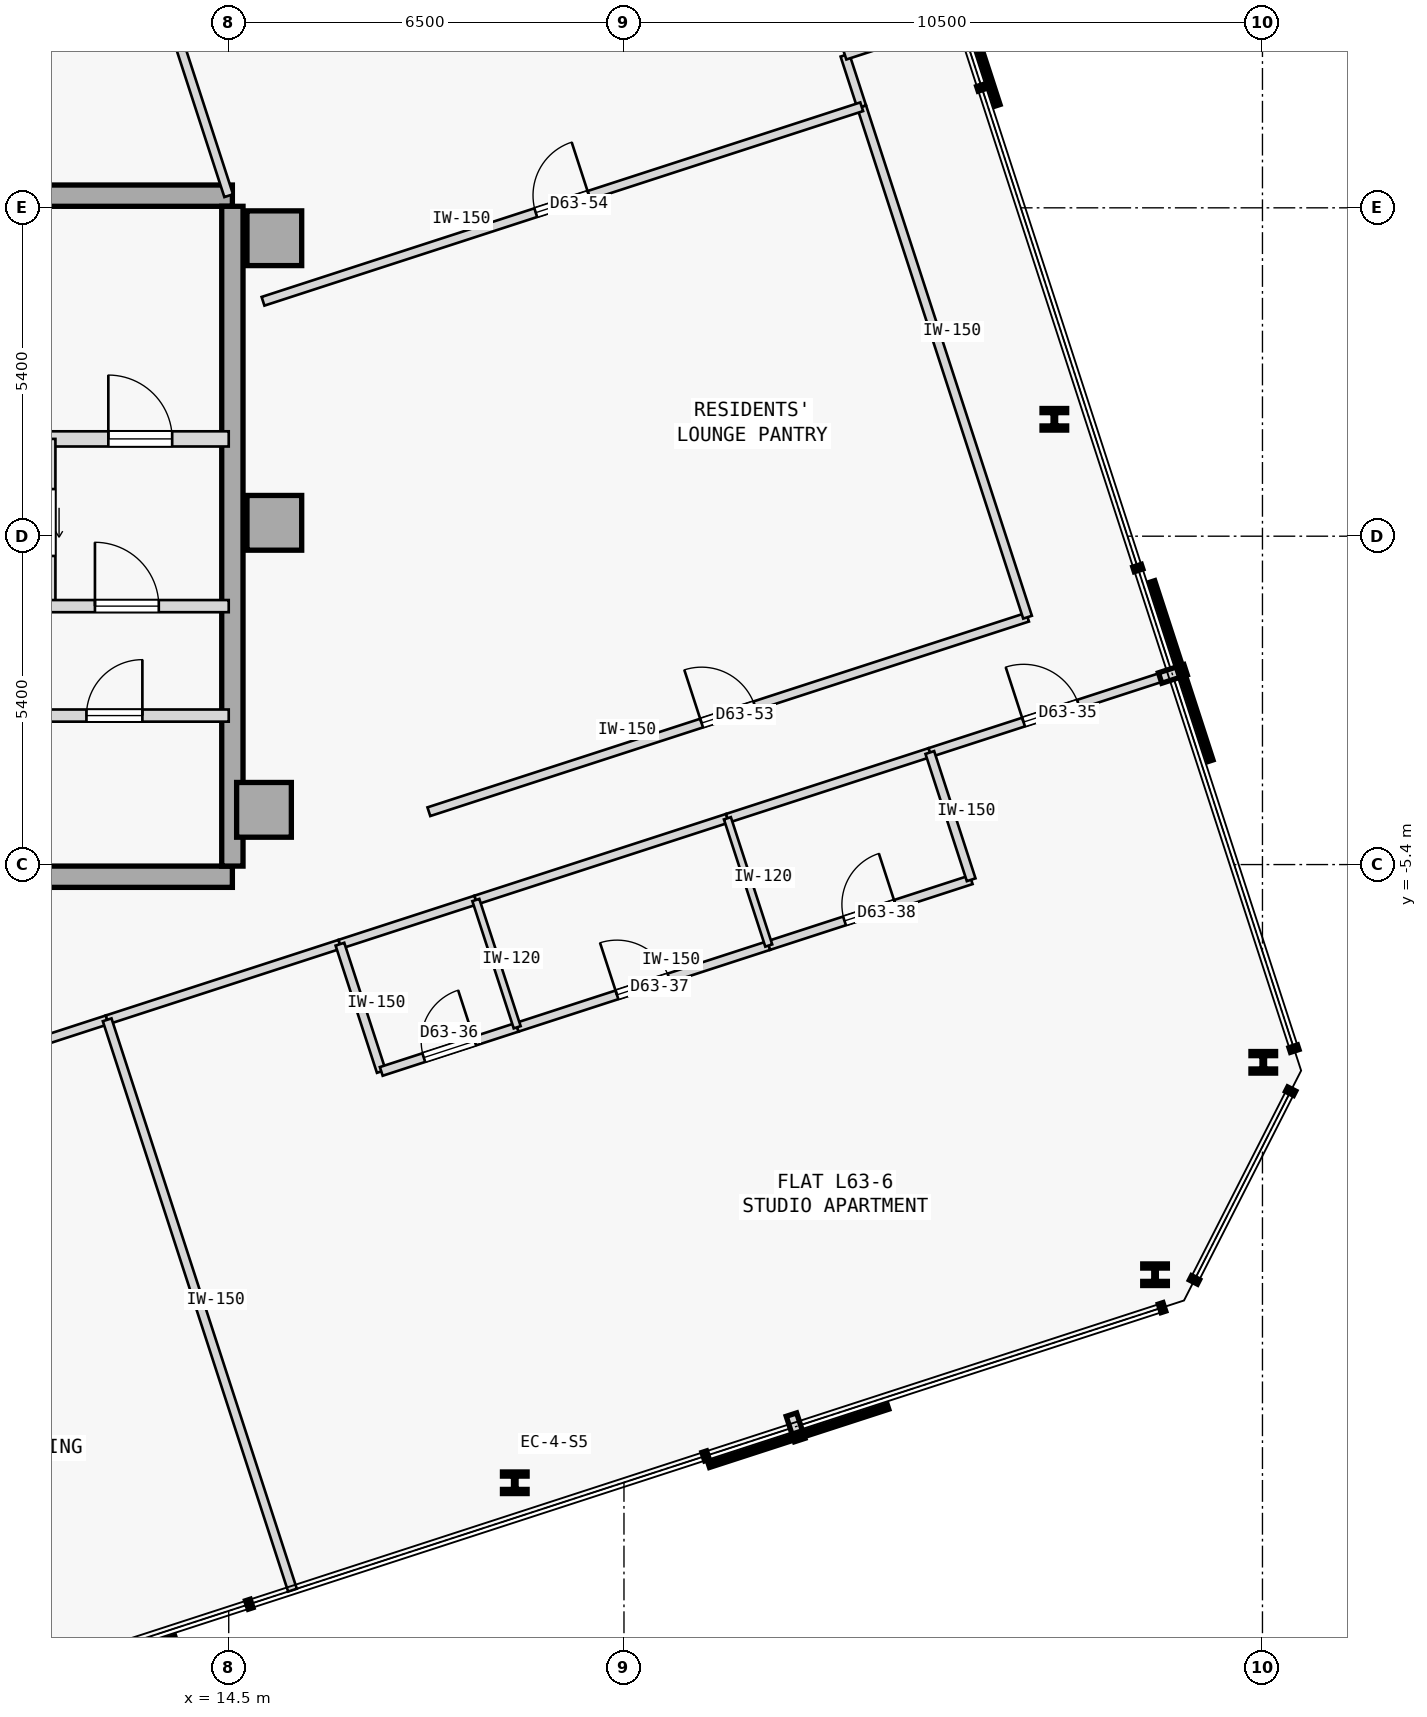
"""IFC4 building model, lengths in metres.
Left out: names, types, materials, properties, quantities, classifications, styles, units other than length and angle.
Written with IfcOpenShell. Run it as: python <this file> out.ifc"""

import sys

from ifc_helpers import new_model, si_unit, direction, frame, frame_2d, origin, origin_2d, place, context, subcontext, project, spatial, rectangle, i_section, extrude, element, fill, save


model = new_model("IFC4")
c1 = context("Model", 3, precision=1e-05, world=origin(), true_north=direction((0.0, 1.0)))
c2 = subcontext(c1, "Body", "Model", "MODEL_VIEW")
j1 = project(units=[si_unit("LENGTHUNIT", "METRE"), si_unit("PLANEANGLEUNIT", "RADIAN")], contexts=[c1])
p1 = place(None, origin())
s1 = spatial("IfcSite", under=j1, at=p1, CompositionType="ELEMENT")
p2 = place(p1, origin())
s2 = spatial("IfcBuilding", under=s1, at=p2, CompositionType="ELEMENT")
p3 = place(p2, frame((0.0, 0.0, 237.7)))
s3 = spatial("IfcBuildingStorey", under=s2, at=p3, CompositionType="ELEMENT", Elevation=237.7)
for number, where, z_axis, x_axis in (
    (1, (15.25, 4.9, 0.0), (0.0, 0.0, 1.0), (1.0, 0.0, 0.0)),
    (2, (15.25, 0.22, 0.0), (0.0, 0.0, 1.0), (1.0, 0.0, 0.0)),
    (3, (15.08, -4.5, 0.0), (0.0, 0.0, 1.0), (1.0, 0.0, 0.0)),
):
    element("IfcColumn", number, at=place(p3, frame(where, z_axis=z_axis, x_axis=x_axis)), inside=s3, PredefinedType="COLUMN", context=c2, shape_type="SweptSolid", body=[
        extrude(rectangle(XDim=0.9, YDim=0.9, at=origin_2d()), origin(), (0.0, 0.0, 1.0), 3.35),
    ])
p4 = place(p3, frame((3.15, 5.6, 0.0), z_axis=(0.0, 0.0, 1.0), x_axis=(1.0, 0.0, 0.0)))
e4 = element("IfcWall", 4, at=p4, inside=s3, PredefinedType="SHEAR", context=c2, shape_type="SweptSolid", body=[
    extrude(rectangle(XDim=11.41, YDim=0.35, at=frame_2d((5.705, 0.0))), origin(), (0.0, 0.0, 1.0), 3.125),
])
p5 = place(p3, frame((3.7, -5.6, 0.0), z_axis=(0.0, 0.0, 1.0), x_axis=(1.0, 0.0, 0.0)))
e5 = element("IfcWall", 5, at=p5, inside=s3, PredefinedType="SHEAR", context=c2, shape_type="SweptSolid", body=[
    extrude(rectangle(XDim=10.86, YDim=0.35, at=frame_2d((5.43, 0.0))), origin(), (0.0, 0.0, 1.0), 3.125),
])
p6 = place(p3, frame((14.56, -5.425, 0.0), z_axis=(0.0, 0.0, 1.0), x_axis=(0.0, 1.0, 0.0)))
e6 = element("IfcWall", 6, at=p6, inside=s3, PredefinedType="SHEAR", context=c2, shape_type="SweptSolid", body=[
    extrude(rectangle(XDim=10.85, YDim=0.35, at=frame_2d((5.425, 0.0))), origin(), (0.0, 0.0, 1.0), 3.125),
])
for number, where, z_axis, x_axis in (
    (7, (19.204, -15.566, 0.0), (0.0, 0.0, 1.0), (1.0, 0.0, 0.0)),
    (8, (29.734, -12.145, 0.0), (0.0, 0.0, 1.0), (1.0, 0.0, 0.0)),
    (9, (31.513, -8.652, 0.0), (0.0, 0.0, 1.0), (1.0, 0.0, 0.0)),
    (10, (28.078, 1.922, 0.0), (0.0, 0.0, 1.0), (1.0, 0.0, 0.0)),
):
    element("IfcColumn", number, at=place(p3, frame(where, z_axis=z_axis, x_axis=x_axis)), inside=s3, PredefinedType="COLUMN", context=c2, shape_type="SweptSolid", body=[
        extrude(i_section(OverallWidth=0.405, OverallDepth=0.355, WebThickness=0.042, FlangeThickness=0.068, FilletRadius=0.015, at=origin_2d()), origin(), (0.0, 0.0, 1.0), 3.35),
    ])
p7 = place(p3, frame((10.9, 1.6, 0.0), z_axis=(0.0, 0.0, 1.0), x_axis=(1.0, 0.0, 0.0)))
e11 = element("IfcWall", 11, at=p7, inside=s3, PredefinedType="STANDARD", context=c2, shape_type="SweptSolid", body=[
    extrude(rectangle(XDim=3.6, YDim=0.25, at=frame_2d((1.8, 0.0))), origin(), (0.0, 0.0, 1.0), 3.125),
])
p8 = place(p7, frame((1.62, 0.0, 0.0)))
e12 = element("IfcOpeningElement", 12, at=p8, cuts=e11, PredefinedType="OPENING", context=c2, shape_type="SweptSolid", body=[
    extrude(rectangle(XDim=1.05, YDim=2.15, at=frame_2d((0.525, 1.075))), frame((0.0, 0.135, 0.0), z_axis=(0.0, -1.0, 0.0), x_axis=(1.0, 0.0, 0.0)), (0.0, 0.0, 1.0), 0.27),
])
p9 = place(p3, frame((11.55, -1.15, 0.0), z_axis=(0.0, 0.0, 1.0), x_axis=(0.0, 1.0, 0.0)))
e13 = element("IfcWall", 13, at=p9, inside=s3, PredefinedType="STANDARD", context=c2, shape_type="SweptSolid", body=[
    extrude(rectangle(XDim=2.75, YDim=0.2, at=frame_2d((1.375, 0.0))), origin(), (0.0, 0.0, 1.0), 3.125),
])
p10 = place(p9, frame((0.825, 0.0, 0.0)))
e14 = element("IfcOpeningElement", 14, at=p10, cuts=e13, PredefinedType="OPENING", context=c2, shape_type="SweptSolid", body=[
    extrude(rectangle(XDim=1.1, YDim=2.15, at=frame_2d((0.55, 1.075))), frame((0.0, 0.11, 0.0), z_axis=(0.0, -1.0, 0.0), x_axis=(1.0, 0.0, 0.0)), (0.0, 0.0, 1.0), 0.22),
])
p11 = place(p3, frame((11.55, -1.15, 0.0), z_axis=(0.0, 0.0, 1.0), x_axis=(1.0, 0.0, 0.0)))
e15 = element("IfcWall", 15, at=p11, inside=s3, PredefinedType="STANDARD", context=c2, shape_type="SweptSolid", body=[
    extrude(rectangle(XDim=2.95, YDim=0.2, at=frame_2d((1.475, 0.0))), origin(), (0.0, 0.0, 1.0), 3.125),
])
p12 = place(p11, frame((0.75, 0.0, 0.0)))
e16 = element("IfcOpeningElement", 16, at=p12, cuts=e15, PredefinedType="OPENING", context=c2, shape_type="SweptSolid", body=[
    extrude(rectangle(XDim=1.05, YDim=2.18, at=frame_2d((0.525, 1.09))), frame((0.0, 0.11, 0.0), z_axis=(0.0, -1.0, 0.0), x_axis=(1.0, 0.0, 0.0)), (0.0, 0.0, 1.0), 0.22),
])
p13 = place(p3, frame((3.7, -2.95, 0.0), z_axis=(0.0, 0.0, 1.0), x_axis=(1.0, 0.0, 0.0)))
e17 = element("IfcWall", 17, at=p13, inside=s3, PredefinedType="STANDARD", context=c2, shape_type="SweptSolid", body=[
    extrude(rectangle(XDim=10.8, YDim=0.2, at=frame_2d((5.4, 0.0))), origin(), (0.0, 0.0, 1.0), 3.125),
])
p14 = place(p13, frame((0.53, 0.0, 0.0)))
e18 = element("IfcOpeningElement", 18, at=p14, cuts=e17, PredefinedType="OPENING", context=c2, shape_type="SweptSolid", body=[
    extrude(rectangle(XDim=1.1, YDim=2.15, at=frame_2d((0.55, 1.075))), frame((0.0, 0.11, 0.0), z_axis=(0.0, -1.0, 0.0), x_axis=(1.0, 0.0, 0.0)), (0.0, 0.0, 1.0), 0.22),
])
p15 = place(p13, frame((4.14, 0.0, 0.0)))
e19 = element("IfcOpeningElement", 19, at=p15, cuts=e17, PredefinedType="OPENING", context=c2, shape_type="SweptSolid", body=[
    extrude(rectangle(XDim=0.92, YDim=2.15, at=frame_2d((0.46, 1.075))), frame((0.0, 0.11, 0.0), z_axis=(0.0, -1.0, 0.0), x_axis=(1.0, 0.0, 0.0)), (0.0, 0.0, 1.0), 0.22),
])
p16 = place(p13, frame((8.46, 0.0, 0.0)))
e20 = element("IfcOpeningElement", 20, at=p16, cuts=e17, PredefinedType="OPENING", context=c2, shape_type="SweptSolid", body=[
    extrude(rectangle(XDim=0.92, YDim=2.15, at=frame_2d((0.46, 1.075))), frame((0.0, 0.11, 0.0), z_axis=(0.0, -1.0, 0.0), x_axis=(1.0, 0.0, 0.0)), (0.0, 0.0, 1.0), 0.22),
])
p17 = place(p3, frame((6.926, -9.765, 0.0), z_axis=(0.0, 0.0, 1.0), x_axis=(0.951054878391, 0.30902203528, 0.0)))
e21 = element("IfcWall", 21, at=p17, inside=s3, PredefinedType="PARTITIONING", context=c2, shape_type="SweptSolid", body=[
    extrude(rectangle(XDim=5.862, YDim=0.15, at=frame_2d((2.931, 0.0))), origin(), (0.0, 0.0, 1.0), 3.125),
])
p18 = place(p17, frame((2.456, 0.0, 0.0)))
e22 = element("IfcOpeningElement", 22, at=p18, cuts=e21, PredefinedType="OPENING", context=c2, shape_type="SweptSolid", body=[
    extrude(rectangle(XDim=0.95, YDim=2.15, at=frame_2d((0.475, 1.075))), frame((0.0, 0.085, 0.0), z_axis=(0.0, -1.0, 0.0), x_axis=(1.0, 0.0, 0.0)), (0.0, 0.0, 1.0), 0.17),
])
p19 = place(p3, frame((12.501, -7.953, 0.0), z_axis=(0.0, 0.0, 1.0), x_axis=(0.951046103464, 0.309049039936, 0.0)))
e23 = element("IfcWall", 23, at=p19, inside=s3, PredefinedType="PARTITIONING", context=c2, shape_type="SweptSolid", body=[
    extrude(rectangle(XDim=4.025, YDim=0.15, at=frame_2d((2.012, 0.0))), origin(), (0.0, 0.0, 1.0), 3.125),
])
p20 = place(p3, frame((26.03, -3.557, 0.0), z_axis=(0.0, 0.0, 1.0), x_axis=(0.951050334989, 0.309036017832, 0.0)))
e24 = element("IfcWall", 24, at=p20, inside=s3, PredefinedType="PARTITIONING", context=c2, shape_type="SweptSolid", body=[
    extrude(rectangle(XDim=4.191, YDim=0.15, at=frame_2d((2.095, 0.0))), origin(), (0.0, 0.0, 1.0), 3.125),
])
p21 = place(p20, frame((1.621, 0.0, 0.0)))
e25 = element("IfcOpeningElement", 25, at=p21, cuts=e24, PredefinedType="OPENING", context=c2, shape_type="SweptSolid", body=[
    extrude(rectangle(XDim=0.95, YDim=2.15, at=frame_2d((0.475, 1.075))), frame((0.0, 0.085, 0.0), z_axis=(0.0, -1.0, 0.0), x_axis=(1.0, 0.0, 0.0)), (0.0, 0.0, 1.0), 0.17),
])
p22 = place(p3, frame((16.329, -6.709, 0.0), z_axis=(0.0, 0.0, 1.0), x_axis=(0.951076048914, 0.308956872689, 0.0)))
e26 = element("IfcWall", 26, at=p22, inside=s3, PredefinedType="PARTITIONING", context=c2, shape_type="SweptSolid", body=[
    extrude(rectangle(XDim=2.35, YDim=0.15, at=frame_2d((1.175, 0.0))), origin(), (0.0, 0.0, 1.0), 3.125),
])
p23 = place(p3, frame((18.564, -5.983, 0.0), z_axis=(0.0, 0.0, 1.0), x_axis=(0.951052627573, 0.309028962374, 0.0)))
e27 = element("IfcWall", 27, at=p23, inside=s3, PredefinedType="PARTITIONING", context=c2, shape_type="SweptSolid", body=[
    extrude(rectangle(XDim=4.35, YDim=0.15, at=frame_2d((2.175, 0.0))), origin(), (0.0, 0.0, 1.0), 3.125),
])
p24 = place(p3, frame((22.701, -4.639, 0.0), z_axis=(0.0, 0.0, 1.0), x_axis=(0.951062257173, 0.308999325213, 0.0)))
e28 = element("IfcWall", 28, at=p24, inside=s3, PredefinedType="PARTITIONING", context=c2, shape_type="SweptSolid", body=[
    extrude(rectangle(XDim=3.5, YDim=0.15, at=frame_2d((1.75, 0.0))), origin(), (0.0, 0.0, 1.0), 3.125),
])
p25 = place(p3, frame((17.791, -4.531, 0.0), z_axis=(0.0, 0.0, 1.0), x_axis=(0.951056769902, 0.309016213852, 0.0)))
e29 = element("IfcWall", 29, at=p25, inside=s3, PredefinedType="PARTITIONING", context=c2, shape_type="SweptSolid", body=[
    extrude(rectangle(XDim=10.352, YDim=0.15, at=frame_2d((5.176, 0.0))), origin(), (0.0, 0.0, 1.0), 3.125),
])
p26 = place(p25, frame((4.716, 0.0, 0.0)))
e30 = element("IfcOpeningElement", 30, at=p26, cuts=e29, PredefinedType="OPENING", context=c2, shape_type="SweptSolid", body=[
    extrude(rectangle(XDim=0.92, YDim=2.15, at=frame_2d((0.46, 1.075))), frame((0.0, 0.085, 0.0), z_axis=(0.0, -1.0, 0.0), x_axis=(1.0, 0.0, 0.0)), (0.0, 0.0, 1.0), 0.17),
])
p27 = place(p3, frame((27.637, -1.332, 0.0), z_axis=(0.0, 0.0, 1.0), x_axis=(-0.309040411618, 0.951048907253, 0.0)))
e31 = element("IfcWall", 31, at=p27, inside=s3, PredefinedType="PARTITIONING", context=c2, shape_type="SweptSolid", body=[
    extrude(rectangle(XDim=8.826, YDim=0.15, at=frame_2d((4.413, 0.0))), origin(), (0.0, 0.0, 1.0), 3.125),
])
p28 = place(p3, frame((24.909, 7.062, 0.0), z_axis=(0.0, 0.0, 1.0), x_axis=(-0.30899324298, 0.951064233263, 0.0)))
e32 = element("IfcWall", 32, at=p28, inside=s3, PredefinedType="PARTITIONING", context=c2, shape_type="SweptSolid", body=[
    extrude(rectangle(XDim=0.892, YDim=0.15, at=frame_2d((0.446, 0.0))), origin(), (0.0, 0.0, 1.0), 3.125),
])
p29 = place(p3, frame((24.634, 7.91, 0.0), z_axis=(0.0, 0.0, 1.0), x_axis=(0.951054051148, 0.309024581215, 0.0)))
e33 = element("IfcWall", 33, at=p29, inside=s3, PredefinedType="PARTITIONING", context=c2, shape_type="SweptSolid", body=[
    extrude(rectangle(XDim=1.975, YDim=0.15, at=frame_2d((0.988, 0.0))), origin(), (0.0, 0.0, 1.0), 3.125),
])
p30 = place(p3, frame((15.548, -17.333, 0.0), z_axis=(0.0, 0.0, 1.0), x_axis=(-0.308999867152, 0.951062081097, 0.0)))
e34 = element("IfcWall", 34, at=p30, inside=s3, PredefinedType="PARTITIONING", context=c2, shape_type="SweptSolid", body=[
    extrude(rectangle(XDim=9.862, YDim=0.15, at=frame_2d((4.931, 0.0))), origin(), (0.0, 0.0, 1.0), 3.125),
])
p31 = place(p3, frame((17.009, -8.802, 0.0), z_axis=(0.0, 0.0, 1.0), x_axis=(-0.309028364152, 0.951052821956, 0.0)))
e35 = element("IfcWall", 35, at=p31, inside=s3, PredefinedType="PARTITIONING", context=c2, shape_type="SweptSolid", body=[
    extrude(rectangle(XDim=2.2, YDim=0.15, at=frame_2d((1.1, 0.0))), origin(), (0.0, 0.0, 1.0), 3.125),
])
p32 = place(p3, frame((17.009, -8.802, 0.0), z_axis=(0.0, 0.0, 1.0), x_axis=(0.951035595692, 0.309081373955, 0.0)))
e36 = element("IfcWall", 36, at=p32, inside=s3, PredefinedType="PARTITIONING", context=c2, shape_type="SweptSolid", body=[
    extrude(rectangle(XDim=2.35, YDim=0.15, at=frame_2d((1.175, 0.0))), origin(), (0.0, 0.0, 1.0), 3.125),
])
p33 = place(p32, frame((0.735, 0.0, 0.0)))
e37 = element("IfcOpeningElement", 37, at=p33, cuts=e36, PredefinedType="OPENING", context=c2, shape_type="SweptSolid", body=[
    extrude(rectangle(XDim=0.88, YDim=2.15, at=frame_2d((0.44, 1.075))), frame((0.0, 0.085, 0.0), z_axis=(0.0, -1.0, 0.0), x_axis=(1.0, 0.0, 0.0)), (0.0, 0.0, 1.0), 0.17),
])
p34 = place(p3, frame((19.244, -8.075, 0.0), z_axis=(0.0, 0.0, 1.0), x_axis=(0.951057987102, 0.309012467661, 0.0)))
e38 = element("IfcWall", 38, at=p34, inside=s3, PredefinedType="PARTITIONING", context=c2, shape_type="SweptSolid", body=[
    extrude(rectangle(XDim=4.35, YDim=0.15, at=frame_2d((2.175, 0.0))), origin(), (0.0, 0.0, 1.0), 3.125),
])
p35 = place(p34, frame((1.725, 0.0, 0.0)))
e39 = element("IfcOpeningElement", 39, at=p35, cuts=e38, PredefinedType="OPENING", context=c2, shape_type="SweptSolid", body=[
    extrude(rectangle(XDim=0.9, YDim=2.15, at=frame_2d((0.45, 1.075))), frame((0.0, 0.085, 0.0), z_axis=(0.0, -1.0, 0.0), x_axis=(1.0, 0.0, 0.0)), (0.0, 0.0, 1.0), 0.17),
])
p36 = place(p3, frame((23.381, -6.731, 0.0), z_axis=(0.0, 0.0, 1.0), x_axis=(0.951055596592, 0.309019824916, 0.0)))
e40 = element("IfcWall", 40, at=p36, inside=s3, PredefinedType="PARTITIONING", context=c2, shape_type="SweptSolid", body=[
    extrude(rectangle(XDim=3.5, YDim=0.15, at=frame_2d((1.75, 0.0))), origin(), (0.0, 0.0, 1.0), 3.125),
])
p37 = place(p36, frame((1.31, 0.0, 0.0)))
e41 = element("IfcOpeningElement", 41, at=p37, cuts=e40, PredefinedType="OPENING", context=c2, shape_type="SweptSolid", body=[
    extrude(rectangle(XDim=0.88, YDim=2.15, at=frame_2d((0.44, 1.075))), frame((0.0, 0.085, 0.0), z_axis=(0.0, -1.0, 0.0), x_axis=(1.0, 0.0, 0.0)), (0.0, 0.0, 1.0), 0.17),
])
p38 = place(p3, frame((26.709, -5.65, 0.0), z_axis=(0.0, 0.0, 1.0), x_axis=(-0.308960600764, 0.951074837842, 0.0)))
e42 = element("IfcWall", 42, at=p38, inside=s3, PredefinedType="PARTITIONING", context=c2, shape_type="SweptSolid", body=[
    extrude(rectangle(XDim=2.2, YDim=0.15, at=frame_2d((1.1, 0.0))), origin(), (0.0, 0.0, 1.0), 3.125),
])
for number, where, z_axis, x_axis in (
    (43, (19.244, -8.075, 0.0), (0.0, 0.0, 1.0), (-0.309, 0.951, 0.0)),
    (44, (23.381, -6.731, 0.0), (0.0, 0.0, 1.0), (-0.309, 0.951, 0.0)),
):
    element("IfcWall", number, at=place(p3, frame(where, z_axis=z_axis, x_axis=x_axis)), inside=s3, PredefinedType="PARTITIONING", context=c2, shape_type="SweptSolid", body=[
        extrude(rectangle(XDim=2.2, YDim=0.12, at=frame_2d((1.1, 0.0))), origin(), (0.0, 0.0, 1.0), 3.125),
    ])
p39 = place(p3, frame((14.5, 5.6, 0.0), z_axis=(0.0, 0.0, 1.0), x_axis=(-0.308974360462, 0.951070367837, 0.0)))
e45 = element("IfcWall", 45, at=p39, inside=s3, PredefinedType="PARTITIONING", context=c2, shape_type="SweptSolid", body=[
    extrude(rectangle(XDim=4.843, YDim=0.15, at=frame_2d((2.421, 0.0))), origin(), (0.0, 0.0, 1.0), 3.125),
])
p40 = place(p3, frame((15.064, 3.863, 0.0), z_axis=(0.0, 0.0, 1.0), x_axis=(0.951061448945, 0.309001812827, 0.0)))
e46 = element("IfcWall", 46, at=p40, inside=s3, PredefinedType="PARTITIONING", context=c2, shape_type="SweptSolid", body=[
    extrude(rectangle(XDim=10.352, YDim=0.15, at=frame_2d((5.176, 0.0))), origin(), (0.0, 0.0, 1.0), 3.125),
])
p41 = place(p40, frame((4.716, 0.0, 0.0)))
e47 = element("IfcOpeningElement", 47, at=p41, cuts=e46, PredefinedType="OPENING", context=c2, shape_type="SweptSolid", body=[
    extrude(rectangle(XDim=0.92, YDim=2.15, at=frame_2d((0.46, 1.075))), frame((0.0, 0.085, 0.0), z_axis=(0.0, -1.0, 0.0), x_axis=(1.0, 0.0, 0.0)), (0.0, 0.0, 1.0), 0.17),
])
p42 = place(p8, origin())
e48 = element("IfcDoor", 48, at=p42, inside=s3, OperationType="SINGLE_SWING_LEFT", PredefinedType="DOOR", context=c2, shape_type="SweptSolid", body=[
    extrude(rectangle(XDim=1.05, YDim=2.15, at=frame_2d((0.525, 1.075))), frame((0.0, 0.025, 0.0), z_axis=(0.0, -1.0, 0.0), x_axis=(1.0, 0.0, 0.0)), (0.0, 0.0, 1.0), 0.05),
])
fill(e12, e48)
p43 = place(p12, origin())
e49 = element("IfcDoor", 49, at=p43, inside=s3, OperationType="SINGLE_SWING_LEFT", PredefinedType="DOOR", context=c2, shape_type="SweptSolid", body=[
    extrude(rectangle(XDim=1.05, YDim=2.18, at=frame_2d((0.525, 1.09))), frame((0.0, 0.025, 0.0), z_axis=(0.0, -1.0, 0.0), x_axis=(1.0, 0.0, 0.0)), (0.0, 0.0, 1.0), 0.05),
])
fill(e16, e49)
p44 = place(p16, origin())
e50 = element("IfcDoor", 50, at=p44, inside=s3, OperationType="SINGLE_SWING_RIGHT", PredefinedType="DOOR", context=c2, shape_type="SweptSolid", body=[
    extrude(rectangle(XDim=0.92, YDim=2.15, at=frame_2d((0.46, 1.075))), frame((0.0, 0.025, 0.0), z_axis=(0.0, -1.0, 0.0), x_axis=(1.0, 0.0, 0.0)), (0.0, 0.0, 1.0), 0.05),
])
fill(e20, e50)
p45 = place(p21, origin())
e51 = element("IfcDoor", 51, at=p45, inside=s3, OperationType="SINGLE_SWING_LEFT", PredefinedType="DOOR", context=c2, shape_type="SweptSolid", body=[
    extrude(rectangle(XDim=0.95, YDim=2.15, at=frame_2d((0.475, 1.075))), frame((0.0, 0.025, 0.0), z_axis=(0.0, -1.0, 0.0), x_axis=(1.0, 0.0, 0.0)), (0.0, 0.0, 1.0), 0.05),
])
fill(e25, e51)
p46 = place(p33, origin())
e52 = element("IfcDoor", 52, at=p46, inside=s3, OperationType="SINGLE_SWING_RIGHT", PredefinedType="DOOR", context=c2, shape_type="SweptSolid", body=[
    extrude(rectangle(XDim=0.88, YDim=2.15, at=frame_2d((0.44, 1.075))), frame((0.0, 0.025, 0.0), z_axis=(0.0, -1.0, 0.0), x_axis=(1.0, 0.0, 0.0)), (0.0, 0.0, 1.0), 0.05),
])
fill(e37, e52)
p47 = place(p35, origin())
e53 = element("IfcDoor", 53, at=p47, inside=s3, OperationType="SINGLE_SWING_LEFT", PredefinedType="DOOR", context=c2, shape_type="SweptSolid", body=[
    extrude(rectangle(XDim=0.9, YDim=2.15, at=frame_2d((0.45, 1.075))), frame((0.0, 0.025, 0.0), z_axis=(0.0, -1.0, 0.0), x_axis=(1.0, 0.0, 0.0)), (0.0, 0.0, 1.0), 0.05),
])
fill(e39, e53)
p48 = place(p37, origin())
e54 = element("IfcDoor", 54, at=p48, inside=s3, OperationType="SINGLE_SWING_RIGHT", PredefinedType="DOOR", context=c2, shape_type="SweptSolid", body=[
    extrude(rectangle(XDim=0.88, YDim=2.15, at=frame_2d((0.44, 1.075))), frame((0.0, 0.025, 0.0), z_axis=(0.0, -1.0, 0.0), x_axis=(1.0, 0.0, 0.0)), (0.0, 0.0, 1.0), 0.05),
])
fill(e41, e54)
p49 = place(p26, origin())
e55 = element("IfcDoor", 55, at=p49, inside=s3, OperationType="SINGLE_SWING_LEFT", PredefinedType="DOOR", context=c2, shape_type="SweptSolid", body=[
    extrude(rectangle(XDim=0.92, YDim=2.15, at=frame_2d((0.46, 1.075))), frame((0.0, 0.025, 0.0), z_axis=(0.0, -1.0, 0.0), x_axis=(1.0, 0.0, 0.0)), (0.0, 0.0, 1.0), 0.05),
])
fill(e30, e55)
p50 = place(p41, origin())
e56 = element("IfcDoor", 56, at=p50, inside=s3, OperationType="SINGLE_SWING_RIGHT", PredefinedType="DOOR", context=c2, shape_type="SweptSolid", body=[
    extrude(rectangle(XDim=0.92, YDim=2.15, at=frame_2d((0.46, 1.075))), frame((0.0, 0.025, 0.0), z_axis=(0.0, -1.0, 0.0), x_axis=(1.0, 0.0, 0.0)), (0.0, 0.0, 1.0), 0.05),
])
fill(e47, e56)
save(model, sys.argv[1])
